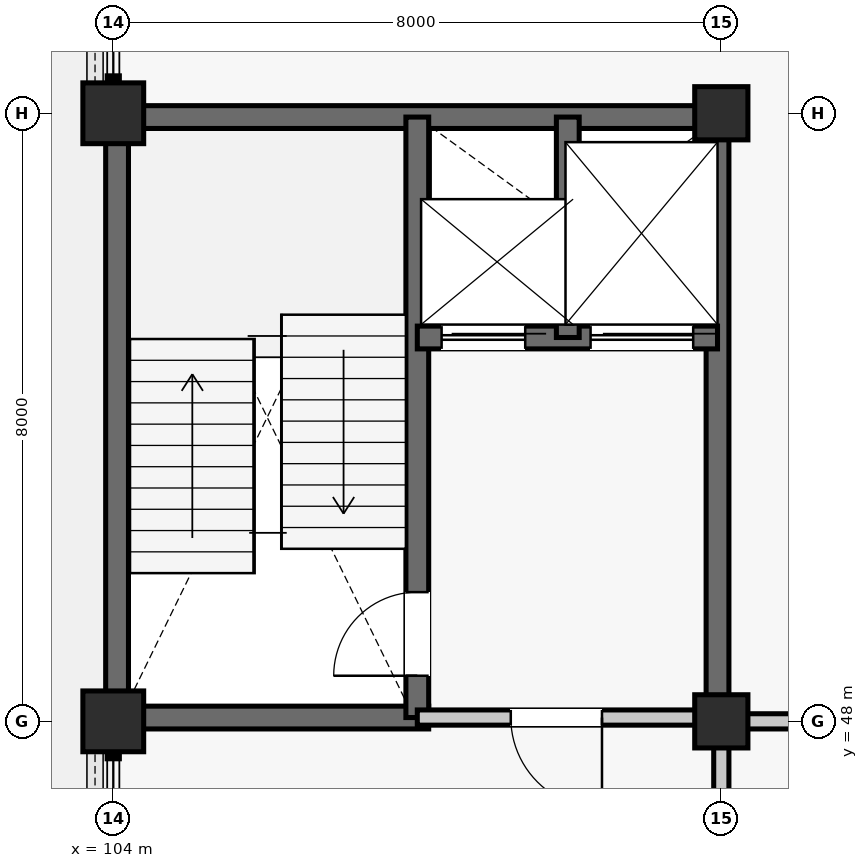
"""IFC4 building model, lengths in metres.
Left out: names, types, materials, properties, quantities, classifications, styles, units other than length and angle.
Written with IfcOpenShell. Run it as: python <this file> out.ifc"""

import sys

from ifc_helpers import new_model, si_unit, direction, frame, frame_2d, origin, origin_2d, place, context, subcontext, project, spatial, rectangle, extrude, element, fill, save


model = new_model("IFC4")
c1 = context("Model", 3, precision=1e-05, world=origin(), true_north=direction((0.0, 1.0)))
c2 = subcontext(c1, "Body", "Model", "MODEL_VIEW")
j1 = project(units=[si_unit("LENGTHUNIT", "METRE"), si_unit("PLANEANGLEUNIT", "RADIAN")], contexts=[c1])
p1 = place(None, origin())
s1 = spatial("IfcSite", under=j1, at=p1, CompositionType="ELEMENT")
p2 = place(p1, origin())
s2 = spatial("IfcBuilding", under=s1, at=p2, CompositionType="ELEMENT")
p3 = place(p2, frame((0.0, 0.0, 13.86)))
s3 = spatial("IfcBuildingStorey", under=s2, at=p3, CompositionType="ELEMENT", Elevation=13.86)
for number, where, z_axis, x_axis in (
    (1, (104.0, 48.0, 0.0), (0.0, 0.0, 1.0), (1.0, 0.0, 0.0)),
    (2, (104.0, 56.0, 0.0), (0.0, 0.0, 1.0), (1.0, 0.0, 0.0)),
):
    element("IfcColumn", number, at=place(p3, frame(where, z_axis=z_axis, x_axis=x_axis)), inside=s3, PredefinedType="COLUMN", context=c2, shape_type="SweptSolid", body=[
        extrude(rectangle(XDim=0.8, YDim=0.8, at=origin_2d()), origin(), (0.0, 0.0, 1.0), 3.96),
    ])
for number, where, z_axis, x_axis in (
    (3, (112.0, 48.0, 0.0), (0.0, 0.0, 1.0), (1.0, 0.0, 0.0)),
    (4, (112.0, 56.0, 0.0), (0.0, 0.0, 1.0), (1.0, 0.0, 0.0)),
):
    element("IfcColumn", number, at=place(p3, frame(where, z_axis=z_axis, x_axis=x_axis)), inside=s3, PredefinedType="COLUMN", context=c2, shape_type="SweptSolid", body=[
        extrude(rectangle(XDim=0.7, YDim=0.7, at=origin_2d()), origin(), (0.0, 0.0, 1.0), 3.96),
    ])
p4 = place(p3, frame((104.05, 48.29, 0.0), z_axis=(0.0, 0.0, 1.0), x_axis=(0.0, 1.0, 0.0)))
e5 = element("IfcWall", 5, at=p4, inside=s3, PredefinedType="SHEAR", context=c2, shape_type="SweptSolid", body=[
    extrude(rectangle(XDim=7.42, YDim=0.3, at=frame_2d((3.71, 0.0))), origin(), (0.0, 0.0, 1.0), 3.725),
])
p5 = place(p3, frame((104.29, 55.95, 0.0), z_axis=(0.0, 0.0, 1.0), x_axis=(1.0, 0.0, 0.0)))
e6 = element("IfcWall", 6, at=p5, inside=s3, PredefinedType="SHEAR", context=c2, shape_type="SweptSolid", body=[
    extrude(rectangle(XDim=7.47, YDim=0.3, at=frame_2d((3.735, 0.0))), origin(), (0.0, 0.0, 1.0), 3.725),
])
p6 = place(p3, frame((111.95, 48.24, 0.0), z_axis=(0.0, 0.0, 1.0), x_axis=(0.0, 1.0, 0.0)))
e7 = element("IfcWall", 7, at=p6, inside=s3, PredefinedType="SHEAR", context=c2, shape_type="SweptSolid", body=[
    extrude(rectangle(XDim=7.52, YDim=0.3, at=frame_2d((3.76, 0.0))), origin(), (0.0, 0.0, 1.0), 3.725),
])
p7 = place(p3, frame((104.29, 48.05, 0.0), z_axis=(0.0, 0.0, 1.0), x_axis=(1.0, 0.0, 0.0)))
e8 = element("IfcWall", 8, at=p7, inside=s3, PredefinedType="SHEAR", context=c2, shape_type="SweptSolid", body=[
    extrude(rectangle(XDim=3.86, YDim=0.3, at=frame_2d((1.93, 0.0))), origin(), (0.0, 0.0, 1.0), 3.725),
])
p8 = place(p3, frame((108.0, 48.05, 0.0), z_axis=(0.0, 0.0, 1.0), x_axis=(0.0, 1.0, 0.0)))
e9 = element("IfcWall", 9, at=p8, inside=s3, PredefinedType="SHEAR", context=c2, shape_type="SweptSolid", body=[
    extrude(rectangle(XDim=7.9, YDim=0.3, at=frame_2d((3.95, 0.0))), origin(), (0.0, 0.0, 1.0), 3.725),
])
p9 = place(p8, frame((0.55, 0.0, 0.0)))
e10 = element("IfcOpeningElement", 10, at=p9, cuts=e9, PredefinedType="OPENING", context=c2, shape_type="SweptSolid", body=[
    extrude(rectangle(XDim=1.1, YDim=2.15, at=frame_2d((0.55, 1.075))), frame((0.0, 0.16, 0.0), z_axis=(0.0, -1.0, 0.0), x_axis=(1.0, 0.0, 0.0)), (0.0, 0.0, 1.0), 0.32),
])
p10 = place(p3, frame((108.0, 53.05, 0.0), z_axis=(0.0, 0.0, 1.0), x_axis=(1.0, 0.0, 0.0)))
e11 = element("IfcWall", 11, at=p10, inside=s3, PredefinedType="SHEAR", context=c2, shape_type="SweptSolid", body=[
    extrude(rectangle(XDim=3.95, YDim=0.3, at=frame_2d((1.975, 0.0))), origin(), (0.0, 0.0, 1.0), 3.725),
])
p11 = place(p10, frame((0.32, 0.0, 0.0)))
e12 = element("IfcOpeningElement", 12, at=p11, cuts=e11, PredefinedType="OPENING", context=c2, shape_type="SweptSolid", body=[
    extrude(rectangle(XDim=1.1, YDim=2.2, at=frame_2d((0.55, 1.1))), frame((0.0, 0.16, 0.0), z_axis=(0.0, -1.0, 0.0), x_axis=(1.0, 0.0, 0.0)), (0.0, 0.0, 1.0), 0.32),
])
p12 = place(p10, frame((2.28, 0.0, 0.0)))
e13 = element("IfcOpeningElement", 13, at=p12, cuts=e11, PredefinedType="OPENING", context=c2, shape_type="SweptSolid", body=[
    extrude(rectangle(XDim=1.35, YDim=2.3, at=frame_2d((0.675, 1.15))), frame((0.0, 0.16, 0.0), z_axis=(0.0, -1.0, 0.0), x_axis=(1.0, 0.0, 0.0)), (0.0, 0.0, 1.0), 0.32),
])
p13 = place(p3, frame((109.98, 53.05, 0.0), z_axis=(0.0, 0.0, 1.0), x_axis=(0.0, 1.0, 0.0)))
e14 = element("IfcWall", 14, at=p13, inside=s3, PredefinedType="SHEAR", context=c2, shape_type="SweptSolid", body=[
    extrude(rectangle(XDim=2.9, YDim=0.3, at=frame_2d((1.45, 0.0))), origin(), (0.0, 0.0, 1.0), 3.725),
])
p14 = place(p3, frame((108.0, 48.05, 0.0), z_axis=(0.0, 0.0, 1.0), x_axis=(1.0, 0.0, 0.0)))
e15 = element("IfcWall", 15, at=p14, inside=s3, PredefinedType="PARTITIONING", context=c2, shape_type="SweptSolid", body=[
    extrude(rectangle(XDim=3.66, YDim=0.2, at=frame_2d((1.83, 0.0))), origin(), (0.0, 0.0, 1.0), 3.452),
])
p15 = place(p14, frame((1.23, 0.0, 0.0)))
e16 = element("IfcOpeningElement", 16, at=p15, cuts=e15, PredefinedType="OPENING", context=c2, shape_type="SweptSolid", body=[
    extrude(rectangle(XDim=1.2, YDim=2.15, at=frame_2d((0.6, 1.075))), frame((0.0, 0.11, 0.0), z_axis=(0.0, -1.0, 0.0), x_axis=(1.0, 0.0, 0.0)), (0.0, 0.0, 1.0), 0.22),
])
p16 = place(p3, frame((112.0, 40.265, 0.0), z_axis=(0.0, 0.0, 1.0), x_axis=(0.0, 1.0, 0.0)))
e17 = element("IfcWall", 17, at=p16, inside=s3, PredefinedType="PARTITIONING", context=c2, shape_type="SweptSolid", body=[
    extrude(rectangle(XDim=7.395, YDim=0.2, at=frame_2d((3.698, 0.0))), origin(), (0.0, 0.0, 1.0), 3.253),
])
p17 = place(p16, frame((3.157, 0.0, 0.0)))
e18 = element("IfcOpeningElement", 18, at=p17, cuts=e17, PredefinedType="OPENING", context=c2, shape_type="SweptSolid", body=[
    extrude(rectangle(XDim=1.08, YDim=2.2, at=frame_2d((0.54, 1.1))), frame((0.0, 0.11, 0.0), z_axis=(0.0, -1.0, 0.0), x_axis=(1.0, 0.0, 0.0)), (0.0, 0.0, 1.0), 0.22),
])
p18 = place(p3, frame((112.34, 48.0, 0.0), z_axis=(0.0, 0.0, 1.0), x_axis=(1.0, 0.0, 0.0)))
e19 = element("IfcWall", 19, at=p18, inside=s3, PredefinedType="PARTITIONING", context=c2, shape_type="SweptSolid", body=[
    extrude(rectangle(XDim=7.395, YDim=0.2, at=frame_2d((3.698, 0.0))), origin(), (0.0, 0.0, 1.0), 3.247),
])
p19 = place(p9, origin())
e20 = element("IfcDoor", 20, at=p19, inside=s3, OperationType="SINGLE_SWING_LEFT", PredefinedType="DOOR", context=c2, shape_type="SweptSolid", body=[
    extrude(rectangle(XDim=1.1, YDim=2.15, at=frame_2d((0.55, 1.075))), frame((0.0, 0.025, 0.0), z_axis=(0.0, -1.0, 0.0), x_axis=(1.0, 0.0, 0.0)), (0.0, 0.0, 1.0), 0.05),
])
fill(e10, e20)
p20 = place(p11, origin())
e21 = element("IfcDoor", 21, at=p20, inside=s3, OperationType="SLIDING_TO_LEFT", PredefinedType="DOOR", context=c2, shape_type="SweptSolid", body=[
    extrude(rectangle(XDim=1.1, YDim=2.2, at=frame_2d((0.55, 1.1))), frame((0.0, 0.025, 0.0), z_axis=(0.0, -1.0, 0.0), x_axis=(1.0, 0.0, 0.0)), (0.0, 0.0, 1.0), 0.05),
])
fill(e12, e21)
p21 = place(p12, origin())
e22 = element("IfcDoor", 22, at=p21, inside=s3, OperationType="DOUBLE_DOOR_SLIDING", PredefinedType="DOOR", context=c2, shape_type="SweptSolid", body=[
    extrude(rectangle(XDim=1.35, YDim=2.3, at=frame_2d((0.675, 1.15))), frame((0.0, 0.025, 0.0), z_axis=(0.0, -1.0, 0.0), x_axis=(1.0, 0.0, 0.0)), (0.0, 0.0, 1.0), 0.05),
])
fill(e13, e22)
p22 = place(p15, frame((1.2, 0.0, 0.0), z_axis=(0.0, 0.0, 1.0), x_axis=(-1.0, 0.0, 0.0)))
e23 = element("IfcDoor", 23, at=p22, inside=s3, OperationType="SINGLE_SWING_RIGHT", PredefinedType="DOOR", context=c2, shape_type="SweptSolid", body=[
    extrude(rectangle(XDim=1.2, YDim=2.15, at=frame_2d((0.6, 1.075))), frame((0.0, 0.025, 0.0), z_axis=(0.0, -1.0, 0.0), x_axis=(1.0, 0.0, 0.0)), (0.0, 0.0, 1.0), 0.05),
])
fill(e16, e23)
save(model, sys.argv[1])
